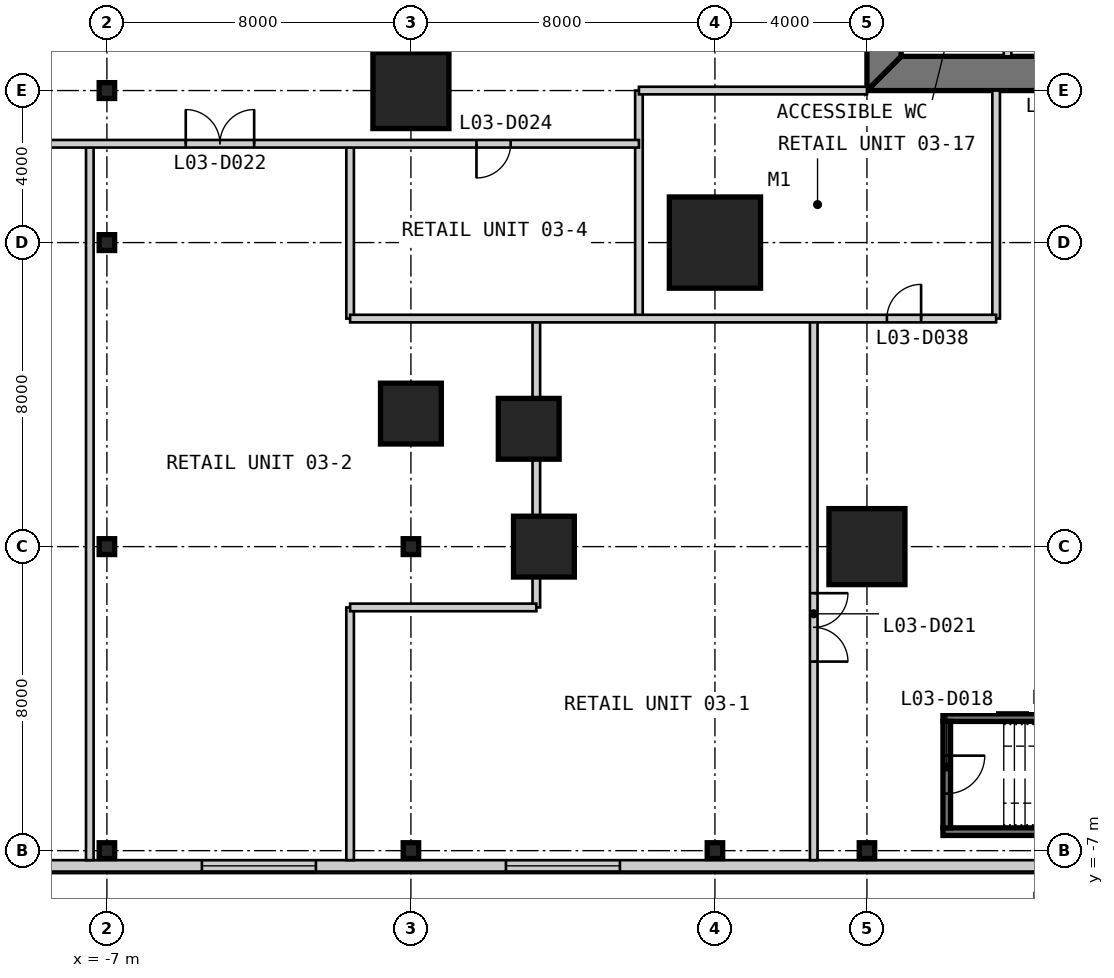
"""IFC4 building model, lengths in metres.
Left out: names, types, materials, properties, quantities, classifications, styles, units other than length and angle.
Written with IfcOpenShell. Run it as: python <this file> out.ifc"""

import sys

from ifc_helpers import new_model, si_unit, direction, frame, frame_2d, origin, origin_2d, place, context, subcontext, project, spatial, polyline, rectangle, i_section, outline, extrude, element, fill, save


model = new_model("IFC4")
c1 = context("Model", 3, precision=1e-05, world=origin(), true_north=direction((0.0, 1.0)))
c2 = subcontext(c1, "Body", "Model", "MODEL_VIEW")
j1 = project(units=[si_unit("LENGTHUNIT", "METRE"), si_unit("PLANEANGLEUNIT", "RADIAN")], contexts=[c1])
p1 = place(None, origin())
s1 = spatial("IfcSite", under=j1, at=p1, CompositionType="ELEMENT")
p2 = place(p1, origin())
s2 = spatial("IfcBuilding", under=s1, at=p2, CompositionType="ELEMENT")
p3 = place(p2, frame((0.0, 0.0, 16.6)))
s3 = spatial("IfcBuildingStorey", under=s2, at=p3, CompositionType="ELEMENT", Elevation=16.6)
p4 = place(p3, frame((9.0, 9.0, 0.0), z_axis=(0.0, 0.0, 1.0), x_axis=(1.0, 0.0, 0.0)))
e1 = element("IfcColumn", 1, at=p4, inside=s3, PredefinedType="COLUMN", context=c2, shape_type="SweptSolid", body=[
    extrude(rectangle(XDim=2.4, YDim=2.4, at=origin_2d()), origin(), (0.0, 0.0, 1.0), 4.8),
])
p5 = place(p3, frame((4.5, 1.0, 0.0), z_axis=(0.0, 0.0, 1.0), x_axis=(1.0, 0.0, 0.0)))
e2 = element("IfcColumn", 2, at=p5, inside=s3, PredefinedType="COLUMN", context=c2, shape_type="SweptSolid", body=[
    extrude(rectangle(XDim=1.6, YDim=1.6, at=origin_2d()), origin(), (0.0, 0.0, 1.0), 4.8),
])
for number, where, z_axis, x_axis in (
    (3, (13.0, 1.0, 0.0), (0.0, 0.0, 1.0), (1.0, 0.0, 0.0)),
    (4, (1.0, 13.0, 0.0), (0.0, 0.0, 1.0), (1.0, 0.0, 0.0)),
):
    element("IfcColumn", number, at=place(p3, frame(where, z_axis=z_axis, x_axis=x_axis)), inside=s3, PredefinedType="COLUMN", context=c2, shape_type="SweptSolid", body=[
        extrude(rectangle(XDim=2.0, YDim=2.0, at=origin_2d()), origin(), (0.0, 0.0, 1.0), 4.8),
    ])
for number, where, z_axis, x_axis in (
    (5, (1.0, 4.5, 0.0), (0.0, 0.0, 1.0), (1.0, 0.0, 0.0)),
    (6, (4.1, 4.1, 0.0), (0.0, 0.0, 1.0), (1.0, 0.0, 0.0)),
):
    element("IfcColumn", number, at=place(p3, frame(where, z_axis=z_axis, x_axis=x_axis)), inside=s3, PredefinedType="COLUMN", context=c2, shape_type="SweptSolid", body=[
        extrude(rectangle(XDim=1.6, YDim=1.6, at=origin_2d()), origin(), (0.0, 0.0, 1.0), 4.8),
    ])
for number, where, z_axis, x_axis in (
    (7, (-7.0, -7.0, 0.0), (0.0, 0.0, 1.0), (1.0, 0.0, 0.0)),
    (8, (-7.0, 1.0, 0.0), (0.0, 0.0, 1.0), (1.0, 0.0, 0.0)),
    (9, (-7.0, 9.0, 0.0), (0.0, 0.0, 1.0), (1.0, 0.0, 0.0)),
    (10, (-7.0, 13.0, 0.0), (0.0, 0.0, 1.0), (1.0, 0.0, 0.0)),
    (11, (1.0, -7.0, 0.0), (0.0, 0.0, 1.0), (1.0, 0.0, 0.0)),
    (12, (1.0, 1.0, 0.0), (0.0, 0.0, 1.0), (1.0, 0.0, 0.0)),
    (13, (9.0, -7.0, 0.0), (0.0, 0.0, 1.0), (1.0, 0.0, 0.0)),
    (14, (13.0, -7.0, 0.0), (0.0, 0.0, 1.0), (1.0, 0.0, 0.0)),
):
    element("IfcColumn", number, at=place(p3, frame(where, z_axis=z_axis, x_axis=x_axis)), inside=s3, PredefinedType="COLUMN", context=c2, shape_type="SweptSolid", body=[
        extrude(i_section(OverallWidth=0.406, OverallDepth=0.417, WebThickness=0.03, FlangeThickness=0.048, at=origin_2d()), origin(), (0.0, 0.0, 1.0), 4.8),
    ])
p6 = place(p3, frame((13.0, 13.45, 0.0), z_axis=(0.0, 0.0, 1.0), x_axis=(1.0, 0.0, 0.0)))
e15 = element("IfcWall", 15, at=p6, inside=s3, PredefinedType="SHEAR", context=c2, shape_type="SweptSolid", body=[
    extrude(outline(polyline([(0.0, -0.45), (24.0, -0.45), (23.1, 0.45), (0.9, 0.45), (0.0, -0.45)])), origin(), (0.0, 0.0, 1.0), 4.8),
])
p7 = place(p6, frame((4.9, 0.0, 0.0)))
e16 = element("IfcOpeningElement", 16, at=p7, cuts=e15, PredefinedType="OPENING", context=c2, shape_type="SweptSolid", body=[
    extrude(rectangle(XDim=1.0, YDim=2.2, at=frame_2d((0.5, 1.1))), frame((0.0, 0.46, 0.0), z_axis=(0.0, -1.0, 0.0), x_axis=(1.0, 0.0, 0.0)), (0.0, 0.0, 1.0), 0.92),
])
p8 = place(p6, frame((8.9, 0.0, 0.0)))
e17 = element("IfcOpeningElement", 17, at=p8, cuts=e15, PredefinedType="OPENING", context=c2, shape_type="SweptSolid", body=[
    extrude(rectangle(XDim=1.1, YDim=2.2, at=frame_2d((0.55, 1.1))), frame((0.0, 0.46, 0.0), z_axis=(0.0, -1.0, 0.0), x_axis=(1.0, 0.0, 0.0)), (0.0, 0.0, 1.0), 0.92),
])
p9 = place(p6, frame((15.05, 0.0, 0.0)))
e18 = element("IfcOpeningElement", 18, at=p9, cuts=e15, PredefinedType="OPENING", context=c2, shape_type="SweptSolid", body=[
    extrude(rectangle(XDim=0.9, YDim=2.2, at=frame_2d((0.45, 1.1))), frame((0.0, 0.46, 0.0), z_axis=(0.0, -1.0, 0.0), x_axis=(1.0, 0.0, 0.0)), (0.0, 0.0, 1.0), 0.92),
])
p10 = place(p6, frame((17.9, 0.0, 0.0)))
e19 = element("IfcOpeningElement", 19, at=p10, cuts=e15, PredefinedType="OPENING", context=c2, shape_type="SweptSolid", body=[
    extrude(rectangle(XDim=1.0, YDim=2.2, at=frame_2d((0.5, 1.1))), frame((0.0, 0.46, 0.0), z_axis=(0.0, -1.0, 0.0), x_axis=(1.0, 0.0, 0.0)), (0.0, 0.0, 1.0), 0.92),
])
p11 = place(p6, frame((21.4, 0.0, 0.0)))
e20 = element("IfcOpeningElement", 20, at=p11, cuts=e15, PredefinedType="OPENING", context=c2, shape_type="SweptSolid", body=[
    extrude(rectangle(XDim=1.0, YDim=2.2, at=frame_2d((0.5, 1.1))), frame((0.0, 0.46, 0.0), z_axis=(0.0, -1.0, 0.0), x_axis=(1.0, 0.0, 0.0)), (0.0, 0.0, 1.0), 0.92),
])
p12 = place(p3, frame((13.45, 36.1, 0.0), z_axis=(0.0, 0.0, 1.0), x_axis=(0.0, -1.0, 0.0)))
e21 = element("IfcWall", 21, at=p12, inside=s3, PredefinedType="SHEAR", context=c2, shape_type="SweptSolid", body=[
    extrude(outline(polyline([(-0.9, -0.45), (23.1, -0.45), (22.2, 0.45), (0.0, 0.45), (-0.9, -0.45)])), origin(), (0.0, 0.0, 1.0), 4.8),
])
p13 = place(p12, frame((20.2, 0.0, 0.0)))
e22 = element("IfcOpeningElement", 22, at=p13, cuts=e21, PredefinedType="OPENING", context=c2, shape_type="SweptSolid", body=[
    extrude(rectangle(XDim=1.0, YDim=2.2, at=frame_2d((0.5, 1.1))), frame((0.0, 0.46, 0.0), z_axis=(0.0, -1.0, 0.0), x_axis=(1.0, 0.0, 0.0)), (0.0, 0.0, 1.0), 0.92),
])
p14 = place(p12, frame((17.25, 0.0, 0.0)))
e23 = element("IfcOpeningElement", 23, at=p14, cuts=e21, PredefinedType="OPENING", context=c2, shape_type="SweptSolid", body=[
    extrude(rectangle(XDim=0.9, YDim=2.2, at=frame_2d((0.45, 1.1))), frame((0.0, 0.46, 0.0), z_axis=(0.0, -1.0, 0.0), x_axis=(1.0, 0.0, 0.0)), (0.0, 0.0, 1.0), 0.92),
])
p15 = place(p3, frame((-15.55, -7.4, 0.0), z_axis=(0.0, 0.0, 1.0), x_axis=(1.0, 0.0, 0.0)))
e24 = element("IfcWall", 24, at=p15, inside=s3, PredefinedType="SOLIDWALL", context=c2, shape_type="SweptSolid", body=[
    extrude(rectangle(XDim=73.1, YDim=0.3, at=frame_2d((36.55, 0.0))), origin(), (0.0, 0.0, 1.0), 4.5),
])
p16 = place(p15, frame((3.05, 0.0, 0.9)))
e25 = element("IfcOpeningElement", 25, at=p16, cuts=e24, PredefinedType="OPENING", context=c2, shape_type="SweptSolid", body=[
    extrude(rectangle(XDim=3.0, YDim=2.4, at=frame_2d((1.5, 1.2))), frame((0.0, 0.16, 0.0), z_axis=(0.0, -1.0, 0.0), x_axis=(1.0, 0.0, 0.0)), (0.0, 0.0, 1.0), 0.32),
])
p17 = place(p15, frame((11.05, 0.0, 0.9)))
e26 = element("IfcOpeningElement", 26, at=p17, cuts=e24, PredefinedType="OPENING", context=c2, shape_type="SweptSolid", body=[
    extrude(rectangle(XDim=3.0, YDim=2.4, at=frame_2d((1.5, 1.2))), frame((0.0, 0.16, 0.0), z_axis=(0.0, -1.0, 0.0), x_axis=(1.0, 0.0, 0.0)), (0.0, 0.0, 1.0), 0.32),
])
p18 = place(p15, frame((19.05, 0.0, 0.9)))
e27 = element("IfcOpeningElement", 27, at=p18, cuts=e24, PredefinedType="OPENING", context=c2, shape_type="SweptSolid", body=[
    extrude(rectangle(XDim=3.0, YDim=2.4, at=frame_2d((1.5, 1.2))), frame((0.0, 0.16, 0.0), z_axis=(0.0, -1.0, 0.0), x_axis=(1.0, 0.0, 0.0)), (0.0, 0.0, 1.0), 0.32),
])
p19 = place(p15, frame((33.05, 0.0, 0.9)))
e28 = element("IfcOpeningElement", 28, at=p19, cuts=e24, PredefinedType="OPENING", context=c2, shape_type="SweptSolid", body=[
    extrude(rectangle(XDim=3.0, YDim=2.4, at=frame_2d((1.5, 1.2))), frame((0.0, 0.16, 0.0), z_axis=(0.0, -1.0, 0.0), x_axis=(1.0, 0.0, 0.0)), (0.0, 0.0, 1.0), 0.32),
])
p20 = place(p15, frame((45.05, 0.0, 0.9)))
e29 = element("IfcOpeningElement", 29, at=p20, cuts=e24, PredefinedType="OPENING", context=c2, shape_type="SweptSolid", body=[
    extrude(rectangle(XDim=3.0, YDim=2.4, at=frame_2d((1.5, 1.2))), frame((0.0, 0.16, 0.0), z_axis=(0.0, -1.0, 0.0), x_axis=(1.0, 0.0, 0.0)), (0.0, 0.0, 1.0), 0.32),
])
p21 = place(p15, frame((53.55, 0.0, 0.9)))
e30 = element("IfcOpeningElement", 30, at=p21, cuts=e24, PredefinedType="OPENING", context=c2, shape_type="SweptSolid", body=[
    extrude(rectangle(XDim=3.0, YDim=2.4, at=frame_2d((1.5, 1.2))), frame((0.0, 0.16, 0.0), z_axis=(0.0, -1.0, 0.0), x_axis=(1.0, 0.0, 0.0)), (0.0, 0.0, 1.0), 0.32),
])
p22 = place(p15, frame((59.55, 0.0, 0.9)))
e31 = element("IfcOpeningElement", 31, at=p22, cuts=e24, PredefinedType="OPENING", context=c2, shape_type="SweptSolid", body=[
    extrude(rectangle(XDim=3.0, YDim=2.4, at=frame_2d((1.5, 1.2))), frame((0.0, 0.16, 0.0), z_axis=(0.0, -1.0, 0.0), x_axis=(1.0, 0.0, 0.0)), (0.0, 0.0, 1.0), 0.32),
])
p23 = place(p15, frame((67.05, 0.0, 0.9)))
e32 = element("IfcOpeningElement", 32, at=p23, cuts=e24, PredefinedType="OPENING", context=c2, shape_type="SweptSolid", body=[
    extrude(rectangle(XDim=3.0, YDim=2.4, at=frame_2d((1.5, 1.2))), frame((0.0, 0.16, 0.0), z_axis=(0.0, -1.0, 0.0), x_axis=(1.0, 0.0, 0.0)), (0.0, 0.0, 1.0), 0.32),
])
p24 = place(p3, frame((16.7, 13.9, 0.0), z_axis=(0.0, 0.0, 1.0), x_axis=(0.0, 1.0, 0.0)))
e33 = element("IfcWall", 33, at=p24, inside=s3, PredefinedType="PARTITIONING", context=c2, shape_type="SweptSolid", body=[
    extrude(rectangle(XDim=16.1, YDim=0.2, at=frame_2d((8.05, 0.0))), origin(), (0.0, 0.0, 1.0), 4.6),
])
for number, where, z_axis, x_axis in (
    (34, (15.0, -6.5, 0.0), (0.0, 0.0, 1.0), (1.0, 0.0, 0.0)),
    (35, (23.4, -3.5, 0.0), (0.0, 0.0, 1.0), (-1.0, 0.0, 0.0)),
):
    element("IfcWall", number, at=place(p3, frame(where, z_axis=z_axis, x_axis=x_axis)), inside=s3, PredefinedType="SOLIDWALL", context=c2, shape_type="SweptSolid", body=[
        extrude(rectangle(XDim=8.4, YDim=0.2, at=frame_2d((4.2, 0.0))), origin(), (0.0, 0.0, 1.0), 4.8),
    ])
p25 = place(p3, frame((15.1, -3.6, 0.0), z_axis=(0.0, 0.0, 1.0), x_axis=(0.0, -1.0, 0.0)))
e36 = element("IfcWall", 36, at=p25, inside=s3, PredefinedType="SOLIDWALL", context=c2, shape_type="SweptSolid", body=[
    extrude(rectangle(XDim=2.8, YDim=0.2, at=frame_2d((1.4, 0.0))), origin(), (0.0, 0.0, 1.0), 4.8),
])
p26 = place(p25, frame((0.9, 0.0, 0.0)))
e37 = element("IfcOpeningElement", 37, at=p26, cuts=e36, PredefinedType="OPENING", context=c2, shape_type="SweptSolid", body=[
    extrude(rectangle(XDim=1.0, YDim=2.2, at=frame_2d((0.5, 1.1))), frame((0.0, 0.11, 0.0), z_axis=(0.0, -1.0, 0.0), x_axis=(1.0, 0.0, 0.0)), (0.0, 0.0, 1.0), 0.22),
])
p27 = place(p3, frame((-7.45, -7.25, 0.0), z_axis=(0.0, 0.0, 1.0), x_axis=(0.0, 1.0, 0.0)))
e38 = element("IfcWall", 38, at=p27, inside=s3, PredefinedType="PARTITIONING", context=c2, shape_type="SweptSolid", body=[
    extrude(rectangle(XDim=18.85, YDim=0.2, at=frame_2d((9.425, 0.0))), origin(), (0.0, 0.0, 1.0), 4.5),
])
p28 = place(p3, frame((-0.6, -7.25, 0.0), z_axis=(0.0, 0.0, 1.0), x_axis=(0.0, 1.0, 0.0)))
e39 = element("IfcWall", 39, at=p28, inside=s3, PredefinedType="PARTITIONING", context=c2, shape_type="SweptSolid", body=[
    extrude(rectangle(XDim=6.65, YDim=0.2, at=frame_2d((3.325, 0.0))), origin(), (0.0, 0.0, 1.0), 4.5),
])
p29 = place(p3, frame((-0.6, 7.0, 0.0), z_axis=(0.0, 0.0, 1.0), x_axis=(0.0, 1.0, 0.0)))
e40 = element("IfcWall", 40, at=p29, inside=s3, PredefinedType="PARTITIONING", context=c2, shape_type="SweptSolid", body=[
    extrude(rectangle(XDim=4.6, YDim=0.2, at=frame_2d((2.3, 0.0))), origin(), (0.0, 0.0, 1.0), 4.5),
])
p30 = place(p3, frame((4.3, -0.6, 0.0), z_axis=(0.0, 0.0, 1.0), x_axis=(0.0, 1.0, 0.0)))
e41 = element("IfcWall", 41, at=p30, inside=s3, PredefinedType="PARTITIONING", context=c2, shape_type="SweptSolid", body=[
    extrude(rectangle(XDim=0.8, YDim=0.2, at=frame_2d((0.4, 0.0))), origin(), (0.0, 0.0, 1.0), 4.5),
])
p31 = place(p3, frame((4.3, 1.8, 0.0), z_axis=(0.0, 0.0, 1.0), x_axis=(0.0, 1.0, 0.0)))
e42 = element("IfcWall", 42, at=p31, inside=s3, PredefinedType="PARTITIONING", context=c2, shape_type="SweptSolid", body=[
    extrude(rectangle(XDim=1.5, YDim=0.2, at=frame_2d((0.75, 0.0))), origin(), (0.0, 0.0, 1.0), 3.65),
])
p32 = place(p3, frame((4.3, 4.9, 0.0), z_axis=(0.0, 0.0, 1.0), x_axis=(0.0, 1.0, 0.0)))
e43 = element("IfcWall", 43, at=p32, inside=s3, PredefinedType="PARTITIONING", context=c2, shape_type="SweptSolid", body=[
    extrude(rectangle(XDim=2.1, YDim=0.2, at=frame_2d((1.05, 0.0))), origin(), (0.0, 0.0, 1.0), 4.5),
])
p33 = place(p3, frame((7.0, 7.0, 0.0), z_axis=(0.0, 0.0, 1.0), x_axis=(0.0, 1.0, 0.0)))
e44 = element("IfcWall", 44, at=p33, inside=s3, PredefinedType="PARTITIONING", context=c2, shape_type="SweptSolid", body=[
    extrude(rectangle(XDim=6.0, YDim=0.2, at=frame_2d((3.0, 0.0))), origin(), (0.0, 0.0, 1.0), 4.5),
])
p34 = place(p3, frame((11.6, -7.25, 0.0), z_axis=(0.0, 0.0, 1.0), x_axis=(0.0, 1.0, 0.0)))
e45 = element("IfcWall", 45, at=p34, inside=s3, PredefinedType="PARTITIONING", context=c2, shape_type="SweptSolid", body=[
    extrude(rectangle(XDim=14.25, YDim=0.2, at=frame_2d((7.125, 0.0))), origin(), (0.0, 0.0, 1.0), 4.5),
])
p35 = place(p34, frame((5.225, 0.0, 0.0)))
e46 = element("IfcOpeningElement", 46, at=p35, cuts=e45, PredefinedType="OPENING", context=c2, shape_type="SweptSolid", body=[
    extrude(rectangle(XDim=1.8, YDim=2.4, at=frame_2d((0.9, 1.2))), frame((0.0, 0.11, 0.0), z_axis=(0.0, -1.0, 0.0), x_axis=(1.0, 0.0, 0.0)), (0.0, 0.0, 1.0), 0.22),
])
p36 = place(p3, frame((16.4, 7.0, 0.0), z_axis=(0.0, 0.0, 1.0), x_axis=(0.0, 1.0, 0.0)))
e47 = element("IfcWall", 47, at=p36, inside=s3, PredefinedType="PARTITIONING", context=c2, shape_type="SweptSolid", body=[
    extrude(rectangle(XDim=6.0, YDim=0.2, at=frame_2d((3.0, 0.0))), origin(), (0.0, 0.0, 1.0), 4.5),
])
p37 = place(p3, frame((-0.6, -0.6, 0.0), z_axis=(0.0, 0.0, 1.0), x_axis=(1.0, 0.0, 0.0)))
e48 = element("IfcWall", 48, at=p37, inside=s3, PredefinedType="PARTITIONING", context=c2, shape_type="SweptSolid", body=[
    extrude(rectangle(XDim=4.9, YDim=0.2, at=frame_2d((2.45, 0.0))), origin(), (0.0, 0.0, 1.0), 4.5),
])
p38 = place(p3, frame((-0.6, 7.0, 0.0), z_axis=(0.0, 0.0, 1.0), x_axis=(1.0, 0.0, 0.0)))
e49 = element("IfcWall", 49, at=p38, inside=s3, PredefinedType="PARTITIONING", context=c2, shape_type="SweptSolid", body=[
    extrude(rectangle(XDim=17.0, YDim=0.2, at=frame_2d((8.5, 0.0))), origin(), (0.0, 0.0, 1.0), 4.5),
])
p39 = place(p38, frame((14.125, 0.0, 0.0)))
e50 = element("IfcOpeningElement", 50, at=p39, cuts=e49, PredefinedType="OPENING", context=c2, shape_type="SweptSolid", body=[
    extrude(rectangle(XDim=0.9, YDim=2.2, at=frame_2d((0.45, 1.1))), frame((0.0, 0.11, 0.0), z_axis=(0.0, -1.0, 0.0), x_axis=(1.0, 0.0, 0.0)), (0.0, 0.0, 1.0), 0.22),
])
p40 = place(p3, frame((-15.25, 11.6, 0.0), z_axis=(0.0, 0.0, 1.0), x_axis=(1.0, 0.0, 0.0)))
e51 = element("IfcWall", 51, at=p40, inside=s3, PredefinedType="PARTITIONING", context=c2, shape_type="SweptSolid", body=[
    extrude(rectangle(XDim=22.25, YDim=0.2, at=frame_2d((11.125, 0.0))), origin(), (0.0, 0.0, 1.0), 4.5),
])
p41 = place(p40, frame((10.325, 0.0, 0.0)))
e52 = element("IfcOpeningElement", 52, at=p41, cuts=e51, PredefinedType="OPENING", context=c2, shape_type="SweptSolid", body=[
    extrude(rectangle(XDim=1.8, YDim=2.4, at=frame_2d((0.9, 1.2))), frame((0.0, 0.11, 0.0), z_axis=(0.0, -1.0, 0.0), x_axis=(1.0, 0.0, 0.0)), (0.0, 0.0, 1.0), 0.22),
])
p42 = place(p40, frame((3.025, 0.0, 0.0)))
e53 = element("IfcOpeningElement", 53, at=p42, cuts=e51, PredefinedType="OPENING", context=c2, shape_type="SweptSolid", body=[
    extrude(rectangle(XDim=1.8, YDim=2.4, at=frame_2d((0.9, 1.2))), frame((0.0, 0.11, 0.0), z_axis=(0.0, -1.0, 0.0), x_axis=(1.0, 0.0, 0.0)), (0.0, 0.0, 1.0), 0.22),
])
p43 = place(p40, frame((17.975, 0.0, 0.0)))
e54 = element("IfcOpeningElement", 54, at=p43, cuts=e51, PredefinedType="OPENING", context=c2, shape_type="SweptSolid", body=[
    extrude(rectangle(XDim=0.9, YDim=2.2, at=frame_2d((0.45, 1.1))), frame((0.0, 0.11, 0.0), z_axis=(0.0, -1.0, 0.0), x_axis=(1.0, 0.0, 0.0)), (0.0, 0.0, 1.0), 0.22),
])
p44 = place(p3, frame((7.0, 13.0, 0.0), z_axis=(0.0, 0.0, 1.0), x_axis=(1.0, 0.0, 0.0)))
e55 = element("IfcWall", 55, at=p44, inside=s3, PredefinedType="PARTITIONING", context=c2, shape_type="SweptSolid", body=[
    extrude(rectangle(XDim=6.0, YDim=0.2, at=frame_2d((3.0, 0.0))), origin(), (0.0, 0.0, 1.0), 3.653),
])
p45 = place(p17, origin())
e56 = element("IfcWindow", 56, at=p45, inside=s3, PartitioningType="SINGLE_PANEL", PredefinedType="WINDOW", context=c2, shape_type="SweptSolid", body=[
    extrude(rectangle(XDim=3.0, YDim=2.4, at=frame_2d((1.5, 1.2))), frame((0.0, 0.03, 0.0), z_axis=(0.0, -1.0, 0.0), x_axis=(1.0, 0.0, 0.0)), (0.0, 0.0, 1.0), 0.06),
])
fill(e26, e56)
p46 = place(p18, origin())
e57 = element("IfcWindow", 57, at=p46, inside=s3, PartitioningType="SINGLE_PANEL", PredefinedType="WINDOW", context=c2, shape_type="SweptSolid", body=[
    extrude(rectangle(XDim=3.0, YDim=2.4, at=frame_2d((1.5, 1.2))), frame((0.0, 0.03, 0.0), z_axis=(0.0, -1.0, 0.0), x_axis=(1.0, 0.0, 0.0)), (0.0, 0.0, 1.0), 0.06),
])
fill(e27, e57)
p47 = place(p26, origin())
e58 = element("IfcDoor", 58, at=p47, inside=s3, OperationType="SINGLE_SWING_LEFT", PredefinedType="DOOR", context=c2, shape_type="SweptSolid", body=[
    extrude(rectangle(XDim=1.0, YDim=2.2, at=frame_2d((0.5, 1.1))), frame((0.0, 0.025, 0.0), z_axis=(0.0, -1.0, 0.0), x_axis=(1.0, 0.0, 0.0)), (0.0, 0.0, 1.0), 0.05),
])
fill(e37, e58)
p48 = place(p35, frame((1.8, 0.0, 0.0), z_axis=(0.0, 0.0, 1.0), x_axis=(-1.0, 0.0, 0.0)))
e59 = element("IfcDoor", 59, at=p48, inside=s3, OperationType="DOUBLE_DOOR_SINGLE_SWING", PredefinedType="DOOR", context=c2, shape_type="SweptSolid", body=[
    extrude(rectangle(XDim=1.8, YDim=2.4, at=frame_2d((0.9, 1.2))), frame((0.0, 0.025, 0.0), z_axis=(0.0, -1.0, 0.0), x_axis=(1.0, 0.0, 0.0)), (0.0, 0.0, 1.0), 0.05),
])
fill(e46, e59)
p49 = place(p41, origin())
e60 = element("IfcDoor", 60, at=p49, inside=s3, OperationType="DOUBLE_DOOR_SINGLE_SWING", PredefinedType="DOOR", context=c2, shape_type="SweptSolid", body=[
    extrude(rectangle(XDim=1.8, YDim=2.4, at=frame_2d((0.9, 1.2))), frame((0.0, 0.025, 0.0), z_axis=(0.0, -1.0, 0.0), x_axis=(1.0, 0.0, 0.0)), (0.0, 0.0, 1.0), 0.05),
])
fill(e52, e60)
p50 = place(p43, frame((0.9, 0.0, 0.0), z_axis=(0.0, 0.0, 1.0), x_axis=(-1.0, 0.0, 0.0)))
e61 = element("IfcDoor", 61, at=p50, inside=s3, OperationType="SINGLE_SWING_RIGHT", PredefinedType="DOOR", context=c2, shape_type="SweptSolid", body=[
    extrude(rectangle(XDim=0.9, YDim=2.2, at=frame_2d((0.45, 1.1))), frame((0.0, 0.025, 0.0), z_axis=(0.0, -1.0, 0.0), x_axis=(1.0, 0.0, 0.0)), (0.0, 0.0, 1.0), 0.05),
])
fill(e54, e61)
p51 = place(p39, origin())
e62 = element("IfcDoor", 62, at=p51, inside=s3, OperationType="SINGLE_SWING_RIGHT", PredefinedType="DOOR", context=c2, shape_type="SweptSolid", body=[
    extrude(rectangle(XDim=0.9, YDim=2.2, at=frame_2d((0.45, 1.1))), frame((0.0, 0.025, 0.0), z_axis=(0.0, -1.0, 0.0), x_axis=(1.0, 0.0, 0.0)), (0.0, 0.0, 1.0), 0.05),
])
fill(e50, e62)
save(model, sys.argv[1])
